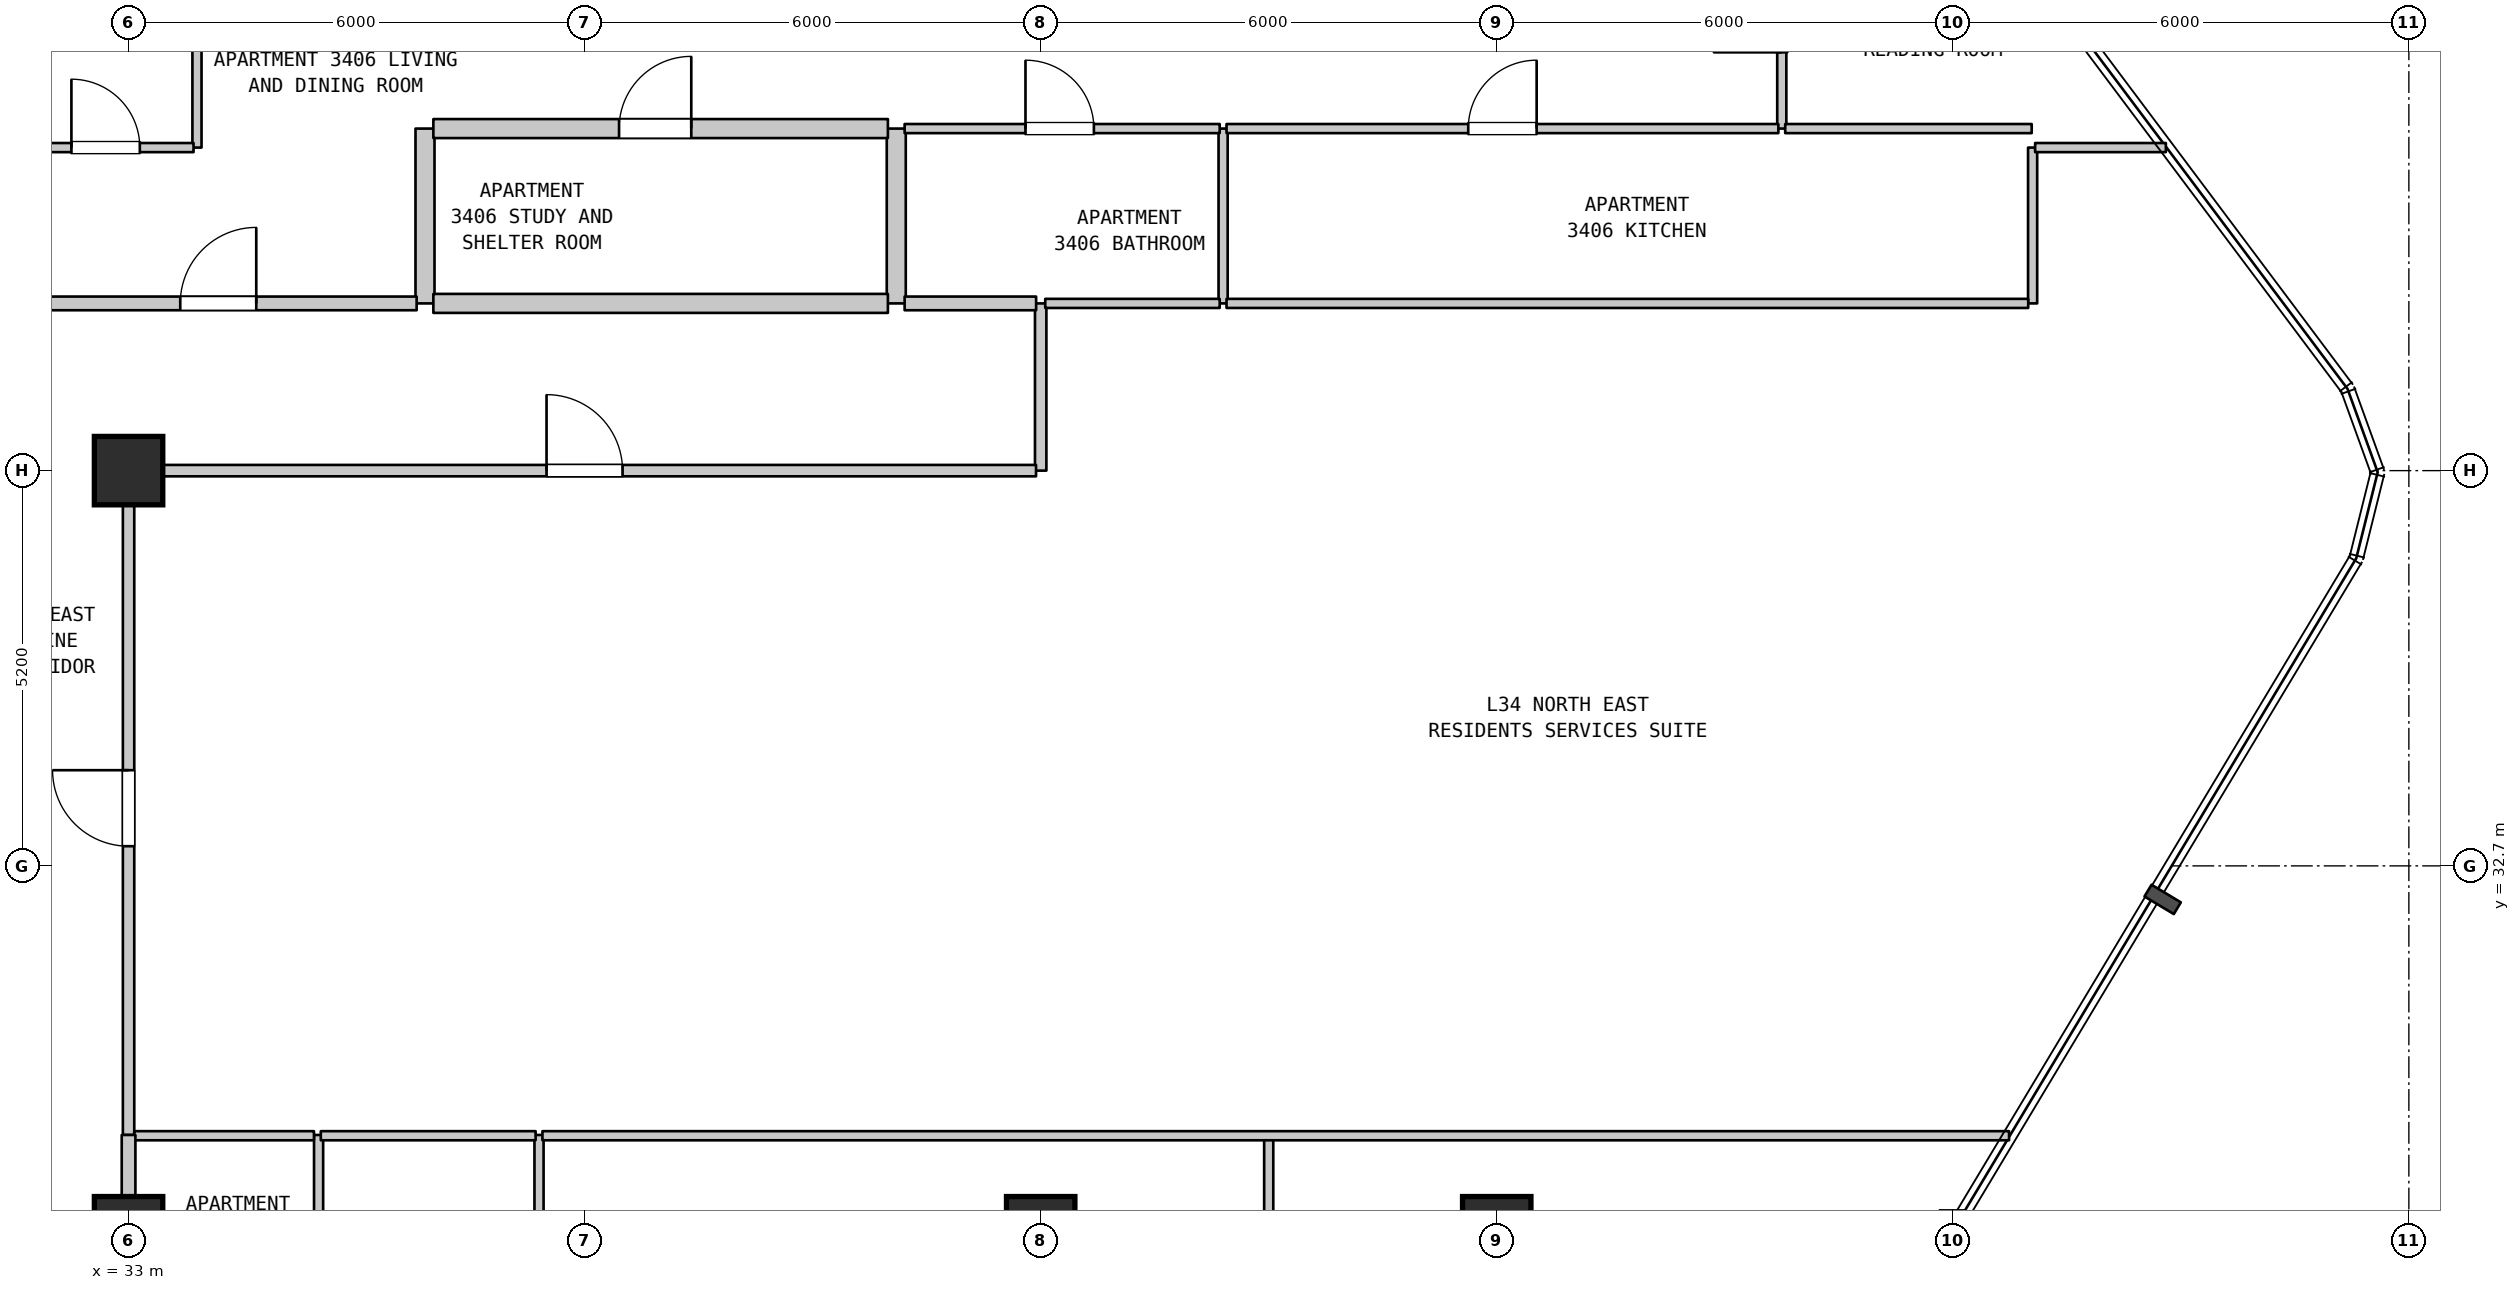
"""IFC4 building model, lengths in metres.
Left out: names, types, materials, properties, quantities, classifications, styles, units other than length and angle.
Written with IfcOpenShell. Run it as: python <this file> out.ifc"""

import sys

from ifc_helpers import new_model, si_unit, direction, frame, frame_2d, origin, origin_2d, place, context, subcontext, project, spatial, rectangle, extrude, element, fill, save


model = new_model("IFC4")
c1 = context("Model", 3, precision=1e-05, world=origin(), true_north=direction((0.0, 1.0)))
c2 = subcontext(c1, "Body", "Model", "MODEL_VIEW")
j1 = project(units=[si_unit("LENGTHUNIT", "METRE"), si_unit("PLANEANGLEUNIT", "RADIAN")], contexts=[c1])
p1 = place(None, origin())
s1 = spatial("IfcSite", under=j1, at=p1, CompositionType="ELEMENT")
p2 = place(p1, origin())
s2 = spatial("IfcBuilding", under=s1, at=p2, CompositionType="ELEMENT")
p3 = place(p2, frame((0.0, 0.0, 140.9)))
s3 = spatial("IfcBuildingStorey", under=s2, at=p3, CompositionType="ELEMENT", Elevation=140.9)
for number, where, z_axis, x_axis in (
    (1, (33.0, 27.9, 0.0), (0.0, 0.0, 1.0), (1.0, 0.0, 0.0)),
    (2, (33.0, 37.9, 0.0), (0.0, 0.0, 1.0), (1.0, 0.0, 0.0)),
    (3, (45.0, 27.9, 0.0), (0.0, 0.0, 1.0), (1.0, 0.0, 0.0)),
    (4, (51.0, 27.9, 0.0), (0.0, 0.0, 1.0), (1.0, 0.0, 0.0)),
):
    element("IfcColumn", number, at=place(p3, frame(where, z_axis=z_axis, x_axis=x_axis)), inside=s3, PredefinedType="COLUMN", context=c2, shape_type="SweptSolid", body=[
        extrude(rectangle(XDim=0.9, YDim=0.9, at=origin_2d()), origin(), (0.0, 0.0, 1.0), 3.7),
    ])
p4 = place(p3, frame((33.0, 29.16, 0.0), z_axis=(0.0, 0.0, 1.0), x_axis=(0.0, 1.0, 0.0)))
e5 = element("IfcWall", 5, at=p4, inside=s3, PredefinedType="STANDARD", context=c2, shape_type="SweptSolid", body=[
    extrude(rectangle(XDim=8.74, YDim=0.15, at=frame_2d((4.37, 0.0))), origin(), (0.0, 0.0, 1.0), 2.885),
])
p5 = place(p4, frame((3.799, 0.0, 0.0)))
e6 = element("IfcOpeningElement", 6, at=p5, cuts=e5, PredefinedType="OPENING", context=c2, shape_type="SweptSolid", body=[
    extrude(rectangle(XDim=1.0, YDim=2.15, at=frame_2d((0.5, 1.075))), frame((0.0, 0.085, 0.0), z_axis=(0.0, -1.0, 0.0), x_axis=(1.0, 0.0, 0.0)), (0.0, 0.0, 1.0), 0.17),
])
p6 = place(p3, frame((33.9, 42.15, 0.0), z_axis=(0.0, 0.0, 1.0), x_axis=(0.0, 1.0, 0.0)))
e7 = element("IfcWall", 7, at=p6, inside=s3, PredefinedType="PARTITIONING", context=c2, shape_type="SweptSolid", body=[
    extrude(rectangle(XDim=3.15, YDim=0.12, at=frame_2d((1.575, 0.0))), origin(), (0.0, 0.0, 1.0), 3.385),
])
p7 = place(p3, frame((35.5, 25.78, 0.0), z_axis=(0.0, 0.0, 1.0), x_axis=(0.0, 1.0, 0.0)))
e8 = element("IfcWall", 8, at=p7, inside=s3, PredefinedType="PARTITIONING", context=c2, shape_type="SweptSolid", body=[
    extrude(rectangle(XDim=3.38, YDim=0.12, at=frame_2d((1.69, 0.0))), origin(), (0.0, 0.0, 1.0), 3.385),
])
p8 = place(p3, frame((36.9, 40.1, 0.0), z_axis=(0.0, 0.0, 1.0), x_axis=(0.0, 1.0, 0.0)))
e9 = element("IfcWall", 9, at=p8, inside=s3, PredefinedType="STANDARD", context=c2, shape_type="SweptSolid", body=[
    extrude(rectangle(XDim=2.3, YDim=0.25, at=frame_2d((1.15, 0.0))), origin(), (0.0, 0.0, 1.0), 3.385),
])
p9 = place(p3, frame((38.4, 25.78, 0.0), z_axis=(0.0, 0.0, 1.0), x_axis=(0.0, 1.0, 0.0)))
e10 = element("IfcWall", 10, at=p9, inside=s3, PredefinedType="PARTITIONING", context=c2, shape_type="SweptSolid", body=[
    extrude(rectangle(XDim=3.38, YDim=0.12, at=frame_2d((1.69, 0.0))), origin(), (0.0, 0.0, 1.0), 3.385),
])
p10 = place(p3, frame((43.1, 40.1, 0.0), z_axis=(0.0, 0.0, 1.0), x_axis=(0.0, 1.0, 0.0)))
e11 = element("IfcWall", 11, at=p10, inside=s3, PredefinedType="STANDARD", context=c2, shape_type="SweptSolid", body=[
    extrude(rectangle(XDim=2.3, YDim=0.25, at=frame_2d((1.15, 0.0))), origin(), (0.0, 0.0, 1.0), 3.385),
])
p11 = place(p3, frame((45.0, 37.9, 0.0), z_axis=(0.0, 0.0, 1.0), x_axis=(0.0, 1.0, 0.0)))
e12 = element("IfcWall", 12, at=p11, inside=s3, PredefinedType="STANDARD", context=c2, shape_type="SweptSolid", body=[
    extrude(rectangle(XDim=2.2, YDim=0.15, at=frame_2d((1.1, 0.0))), origin(), (0.0, 0.0, 1.0), 3.385),
])
p12 = place(p3, frame((47.4, 40.1, 0.0), z_axis=(0.0, 0.0, 1.0), x_axis=(0.0, 1.0, 0.0)))
e13 = element("IfcWall", 13, at=p12, inside=s3, PredefinedType="PARTITIONING", context=c2, shape_type="SweptSolid", body=[
    extrude(rectangle(XDim=2.3, YDim=0.12, at=frame_2d((1.15, 0.0))), origin(), (0.0, 0.0, 1.0), 3.385),
])
p13 = place(p3, frame((48.0, 25.78, 0.0), z_axis=(0.0, 0.0, 1.0), x_axis=(0.0, 1.0, 0.0)))
e14 = element("IfcWall", 14, at=p13, inside=s3, PredefinedType="PARTITIONING", context=c2, shape_type="SweptSolid", body=[
    extrude(rectangle(XDim=3.38, YDim=0.12, at=frame_2d((1.69, 0.0))), origin(), (0.0, 0.0, 1.0), 3.385),
])
p14 = place(p3, frame((54.75, 42.4, 0.0), z_axis=(0.0, 0.0, 1.0), x_axis=(0.0, 1.0, 0.0)))
e15 = element("IfcWall", 15, at=p14, inside=s3, PredefinedType="PARTITIONING", context=c2, shape_type="SweptSolid", body=[
    extrude(rectangle(XDim=3.05, YDim=0.12, at=frame_2d((1.525, 0.0))), origin(), (0.0, 0.0, 1.0), 3.385),
])
p15 = place(p14, frame((1.003, 0.0, 0.0)))
e16 = element("IfcOpeningElement", 16, at=p15, cuts=e15, PredefinedType="OPENING", context=c2, shape_type="SweptSolid", body=[
    extrude(rectangle(XDim=0.9, YDim=2.15, at=frame_2d((0.45, 1.075))), frame((0.0, 0.07, 0.0), z_axis=(0.0, -1.0, 0.0), x_axis=(1.0, 0.0, 0.0)), (0.0, 0.0, 1.0), 0.14),
])
p16 = place(p3, frame((58.05, 40.1, 0.0), z_axis=(0.0, 0.0, 1.0), x_axis=(0.0, 1.0, 0.0)))
e17 = element("IfcWall", 17, at=p16, inside=s3, PredefinedType="PARTITIONING", context=c2, shape_type="SweptSolid", body=[
    extrude(rectangle(XDim=2.05, YDim=0.12, at=frame_2d((1.025, 0.0))), origin(), (0.0, 0.0, 1.0), 3.385),
])
p17 = place(p3, frame((33.075, 29.15, 0.0), z_axis=(0.0, 0.0, 1.0), x_axis=(1.0, 0.0, 0.0)))
e18 = element("IfcWall", 18, at=p17, inside=s3, PredefinedType="PARTITIONING", context=c2, shape_type="SweptSolid", body=[
    extrude(rectangle(XDim=2.364, YDim=0.12, at=frame_2d((1.182, 0.0))), origin(), (0.0, 0.0, 1.0), 3.385),
])
p18 = place(p3, frame((35.529, 29.15, 0.0), z_axis=(0.0, 0.0, 1.0), x_axis=(1.0, 0.0, 0.0)))
e19 = element("IfcWall", 19, at=p18, inside=s3, PredefinedType="PARTITIONING", context=c2, shape_type="SweptSolid", body=[
    extrude(rectangle(XDim=2.826, YDim=0.12, at=frame_2d((1.413, 0.0))), origin(), (0.0, 0.0, 1.0), 3.385),
])
p19 = place(p3, frame((38.445, 29.15, 0.0), z_axis=(0.0, 0.0, 1.0), x_axis=(1.0, 0.0, 0.0)))
e20 = element("IfcWall", 20, at=p19, inside=s3, PredefinedType="PARTITIONING", context=c2, shape_type="SweptSolid", body=[
    extrude(rectangle(XDim=19.295, YDim=0.12, at=frame_2d((9.647, 0.0))), origin(), (0.0, 0.0, 1.0), 3.385),
])
p20 = place(p3, frame((33.06, 37.9, 0.0), z_axis=(0.0, 0.0, 1.0), x_axis=(1.0, 0.0, 0.0)))
e21 = element("IfcWall", 21, at=p20, inside=s3, PredefinedType="STANDARD", context=c2, shape_type="SweptSolid", body=[
    extrude(rectangle(XDim=11.879, YDim=0.15, at=frame_2d((5.939, 0.0))), origin(), (0.0, 0.0, 1.0), 3.385),
])
p21 = place(p20, frame((5.439, 0.0, 0.0)))
e22 = element("IfcOpeningElement", 22, at=p21, cuts=e21, PredefinedType="OPENING", context=c2, shape_type="SweptSolid", body=[
    extrude(rectangle(XDim=1.0, YDim=2.15, at=frame_2d((0.5, 1.075))), frame((0.0, 0.085, 0.0), z_axis=(0.0, -1.0, 0.0), x_axis=(1.0, 0.0, 0.0)), (0.0, 0.0, 1.0), 0.17),
])
p22 = place(p3, frame((31.245, 40.1, 0.0), z_axis=(0.0, 0.0, 1.0), x_axis=(1.0, 0.0, 0.0)))
e23 = element("IfcWall", 23, at=p22, inside=s3, PredefinedType="STANDARD", context=c2, shape_type="SweptSolid", body=[
    extrude(rectangle(XDim=5.545, YDim=0.18, at=frame_2d((2.772, 0.0))), origin(), (0.0, 0.0, 1.0), 3.385),
])
p23 = place(p22, frame((2.435, 0.0, 0.0)))
e24 = element("IfcOpeningElement", 24, at=p23, cuts=e23, PredefinedType="OPENING", context=c2, shape_type="SweptSolid", body=[
    extrude(rectangle(XDim=1.0, YDim=2.15, at=frame_2d((0.5, 1.075))), frame((0.0, 0.1, 0.0), z_axis=(0.0, -1.0, 0.0), x_axis=(1.0, 0.0, 0.0)), (0.0, 0.0, 1.0), 0.2),
])
p24 = place(p3, frame((37.01, 40.1, 0.0), z_axis=(0.0, 0.0, 1.0), x_axis=(1.0, 0.0, 0.0)))
e25 = element("IfcWall", 25, at=p24, inside=s3, PredefinedType="STANDARD", context=c2, shape_type="SweptSolid", body=[
    extrude(rectangle(XDim=5.98, YDim=0.25, at=frame_2d((2.99, 0.0))), origin(), (0.0, 0.0, 1.0), 3.385),
])
p25 = place(p3, frame((43.21, 40.1, 0.0), z_axis=(0.0, 0.0, 1.0), x_axis=(1.0, 0.0, 0.0)))
e26 = element("IfcWall", 26, at=p25, inside=s3, PredefinedType="STANDARD", context=c2, shape_type="SweptSolid", body=[
    extrude(rectangle(XDim=1.73, YDim=0.18, at=frame_2d((0.865, 0.0))), origin(), (0.0, 0.0, 1.0), 3.385),
])
p26 = place(p3, frame((45.06, 40.1, 0.0), z_axis=(0.0, 0.0, 1.0), x_axis=(1.0, 0.0, 0.0)))
e27 = element("IfcWall", 27, at=p26, inside=s3, PredefinedType="PARTITIONING", context=c2, shape_type="SweptSolid", body=[
    extrude(rectangle(XDim=2.295, YDim=0.12, at=frame_2d((1.147, 0.0))), origin(), (0.0, 0.0, 1.0), 3.385),
])
p27 = place(p3, frame((47.445, 40.1, 0.0), z_axis=(0.0, 0.0, 1.0), x_axis=(1.0, 0.0, 0.0)))
e28 = element("IfcWall", 28, at=p27, inside=s3, PredefinedType="PARTITIONING", context=c2, shape_type="SweptSolid", body=[
    extrude(rectangle(XDim=10.547, YDim=0.12, at=frame_2d((5.273, 0.0))), origin(), (0.0, 0.0, 1.0), 3.385),
])
p28 = place(p3, frame((31.695, 42.15, 0.0), z_axis=(0.0, 0.0, 1.0), x_axis=(1.0, 0.0, 0.0)))
e29 = element("IfcWall", 29, at=p28, inside=s3, PredefinedType="PARTITIONING", context=c2, shape_type="SweptSolid", body=[
    extrude(rectangle(XDim=2.16, YDim=0.12, at=frame_2d((1.08, 0.0))), origin(), (0.0, 0.0, 1.0), 3.385),
])
p29 = place(p28, frame((0.553, 0.0, 0.0)))
e30 = element("IfcOpeningElement", 30, at=p29, cuts=e29, PredefinedType="OPENING", context=c2, shape_type="SweptSolid", body=[
    extrude(rectangle(XDim=0.9, YDim=2.15, at=frame_2d((0.45, 1.075))), frame((0.0, 0.07, 0.0), z_axis=(0.0, -1.0, 0.0), x_axis=(1.0, 0.0, 0.0)), (0.0, 0.0, 1.0), 0.14),
])
p30 = place(p3, frame((58.083, 42.15, 0.0), z_axis=(0.0, 0.0, 1.0), x_axis=(1.0, 0.0, 0.0)))
e31 = element("IfcWall", 31, at=p30, inside=s3, PredefinedType="PARTITIONING", context=c2, shape_type="SweptSolid", body=[
    extrude(rectangle(XDim=1.72, YDim=0.12, at=frame_2d((0.86, 0.0))), origin(), (0.0, 0.0, 1.0), 3.385),
])
p31 = place(p3, frame((37.01, 42.4, 0.0), z_axis=(0.0, 0.0, 1.0), x_axis=(1.0, 0.0, 0.0)))
e32 = element("IfcWall", 32, at=p31, inside=s3, PredefinedType="STANDARD", context=c2, shape_type="SweptSolid", body=[
    extrude(rectangle(XDim=5.98, YDim=0.25, at=frame_2d((2.99, 0.0))), origin(), (0.0, 0.0, 1.0), 3.385),
])
p32 = place(p31, frame((2.443, 0.0, 0.0)))
e33 = element("IfcOpeningElement", 33, at=p32, cuts=e32, PredefinedType="OPENING", context=c2, shape_type="SweptSolid", body=[
    extrude(rectangle(XDim=0.95, YDim=2.15, at=frame_2d((0.475, 1.075))), frame((0.0, 0.135, 0.0), z_axis=(0.0, -1.0, 0.0), x_axis=(1.0, 0.0, 0.0)), (0.0, 0.0, 1.0), 0.27),
])
p33 = place(p3, frame((43.21, 42.4, 0.0), z_axis=(0.0, 0.0, 1.0), x_axis=(1.0, 0.0, 0.0)))
e34 = element("IfcWall", 34, at=p33, inside=s3, PredefinedType="PARTITIONING", context=c2, shape_type="SweptSolid", body=[
    extrude(rectangle(XDim=4.145, YDim=0.12, at=frame_2d((2.073, 0.0))), origin(), (0.0, 0.0, 1.0), 3.385),
])
p34 = place(p33, frame((1.59, 0.0, 0.0)))
e35 = element("IfcOpeningElement", 35, at=p34, cuts=e34, PredefinedType="OPENING", context=c2, shape_type="SweptSolid", body=[
    extrude(rectangle(XDim=0.9, YDim=2.1, at=frame_2d((0.45, 1.05))), frame((0.0, 0.07, 0.0), z_axis=(0.0, -1.0, 0.0), x_axis=(1.0, 0.0, 0.0)), (0.0, 0.0, 1.0), 0.14),
])
p35 = place(p3, frame((47.445, 42.4, 0.0), z_axis=(0.0, 0.0, 1.0), x_axis=(1.0, 0.0, 0.0)))
e36 = element("IfcWall", 36, at=p35, inside=s3, PredefinedType="PARTITIONING", context=c2, shape_type="SweptSolid", body=[
    extrude(rectangle(XDim=7.26, YDim=0.12, at=frame_2d((3.63, 0.0))), origin(), (0.0, 0.0, 1.0), 3.385),
])
p36 = place(p35, frame((3.18, 0.0, 0.0)))
e37 = element("IfcOpeningElement", 37, at=p36, cuts=e36, PredefinedType="OPENING", context=c2, shape_type="SweptSolid", body=[
    extrude(rectangle(XDim=0.9, YDim=2.15, at=frame_2d((0.45, 1.075))), frame((0.0, 0.07, 0.0), z_axis=(0.0, -1.0, 0.0), x_axis=(1.0, 0.0, 0.0)), (0.0, 0.0, 1.0), 0.14),
])
p37 = place(p3, frame((54.795, 42.4, 0.0), z_axis=(0.0, 0.0, 1.0), x_axis=(1.0, 0.0, 0.0)))
e38 = element("IfcWall", 38, at=p37, inside=s3, PredefinedType="PARTITIONING", context=c2, shape_type="SweptSolid", body=[
    extrude(rectangle(XDim=3.243, YDim=0.12, at=frame_2d((1.622, 0.0))), origin(), (0.0, 0.0, 1.0), 3.385),
])
p38 = place(p3, frame((33.0, 27.9, 0.0), z_axis=(0.0, 0.0, 1.0), x_axis=(0.0, 1.0, 0.0)))
e39 = element("IfcWall", 39, at=p38, inside=s3, PredefinedType="STANDARD", context=c2, shape_type="SweptSolid", body=[
    extrude(rectangle(XDim=1.26, YDim=0.18, at=frame_2d((0.63, 0.0))), origin(), (0.0, 0.0, 1.0), 2.885),
])
p39 = place(p5, origin())
e40 = element("IfcDoor", 40, at=p39, inside=s3, OperationType="SINGLE_SWING_RIGHT", PredefinedType="DOOR", context=c2, shape_type="SweptSolid", body=[
    extrude(rectangle(XDim=1.0, YDim=2.15, at=frame_2d((0.5, 1.075))), frame((0.0, 0.025, 0.0), z_axis=(0.0, -1.0, 0.0), x_axis=(1.0, 0.0, 0.0)), (0.0, 0.0, 1.0), 0.05),
])
fill(e6, e40)
p40 = place(p21, origin())
e41 = element("IfcDoor", 41, at=p40, inside=s3, OperationType="SINGLE_SWING_LEFT", PredefinedType="DOOR", context=c2, shape_type="SweptSolid", body=[
    extrude(rectangle(XDim=1.0, YDim=2.15, at=frame_2d((0.5, 1.075))), frame((0.0, 0.025, 0.0), z_axis=(0.0, -1.0, 0.0), x_axis=(1.0, 0.0, 0.0)), (0.0, 0.0, 1.0), 0.05),
])
fill(e22, e41)
p41 = place(p23, origin())
e42 = element("IfcDoor", 42, at=p41, inside=s3, OperationType="SINGLE_SWING_RIGHT", PredefinedType="DOOR", context=c2, shape_type="SweptSolid", body=[
    extrude(rectangle(XDim=1.0, YDim=2.15, at=frame_2d((0.5, 1.075))), frame((0.0, 0.025, 0.0), z_axis=(0.0, -1.0, 0.0), x_axis=(1.0, 0.0, 0.0)), (0.0, 0.0, 1.0), 0.05),
])
fill(e24, e42)
p42 = place(p29, origin())
e43 = element("IfcDoor", 43, at=p42, inside=s3, OperationType="SINGLE_SWING_LEFT", PredefinedType="DOOR", context=c2, shape_type="SweptSolid", body=[
    extrude(rectangle(XDim=0.9, YDim=2.15, at=frame_2d((0.45, 1.075))), frame((0.0, 0.025, 0.0), z_axis=(0.0, -1.0, 0.0), x_axis=(1.0, 0.0, 0.0)), (0.0, 0.0, 1.0), 0.05),
])
fill(e30, e43)
p43 = place(p32, origin())
e44 = element("IfcDoor", 44, at=p43, inside=s3, OperationType="SINGLE_SWING_RIGHT", PredefinedType="DOOR", context=c2, shape_type="SweptSolid", body=[
    extrude(rectangle(XDim=0.95, YDim=2.15, at=frame_2d((0.475, 1.075))), frame((0.0, 0.025, 0.0), z_axis=(0.0, -1.0, 0.0), x_axis=(1.0, 0.0, 0.0)), (0.0, 0.0, 1.0), 0.05),
])
fill(e33, e44)
p44 = place(p34, origin())
e45 = element("IfcDoor", 45, at=p44, inside=s3, OperationType="SINGLE_SWING_LEFT", PredefinedType="DOOR", context=c2, shape_type="SweptSolid", body=[
    extrude(rectangle(XDim=0.9, YDim=2.1, at=frame_2d((0.45, 1.05))), frame((0.0, 0.025, 0.0), z_axis=(0.0, -1.0, 0.0), x_axis=(1.0, 0.0, 0.0)), (0.0, 0.0, 1.0), 0.05),
])
fill(e35, e45)
p45 = place(p36, origin())
e46 = element("IfcDoor", 46, at=p45, inside=s3, OperationType="SINGLE_SWING_RIGHT", PredefinedType="DOOR", context=c2, shape_type="SweptSolid", body=[
    extrude(rectangle(XDim=0.9, YDim=2.15, at=frame_2d((0.45, 1.075))), frame((0.0, 0.025, 0.0), z_axis=(0.0, -1.0, 0.0), x_axis=(1.0, 0.0, 0.0)), (0.0, 0.0, 1.0), 0.05),
])
fill(e37, e46)
save(model, sys.argv[1])
